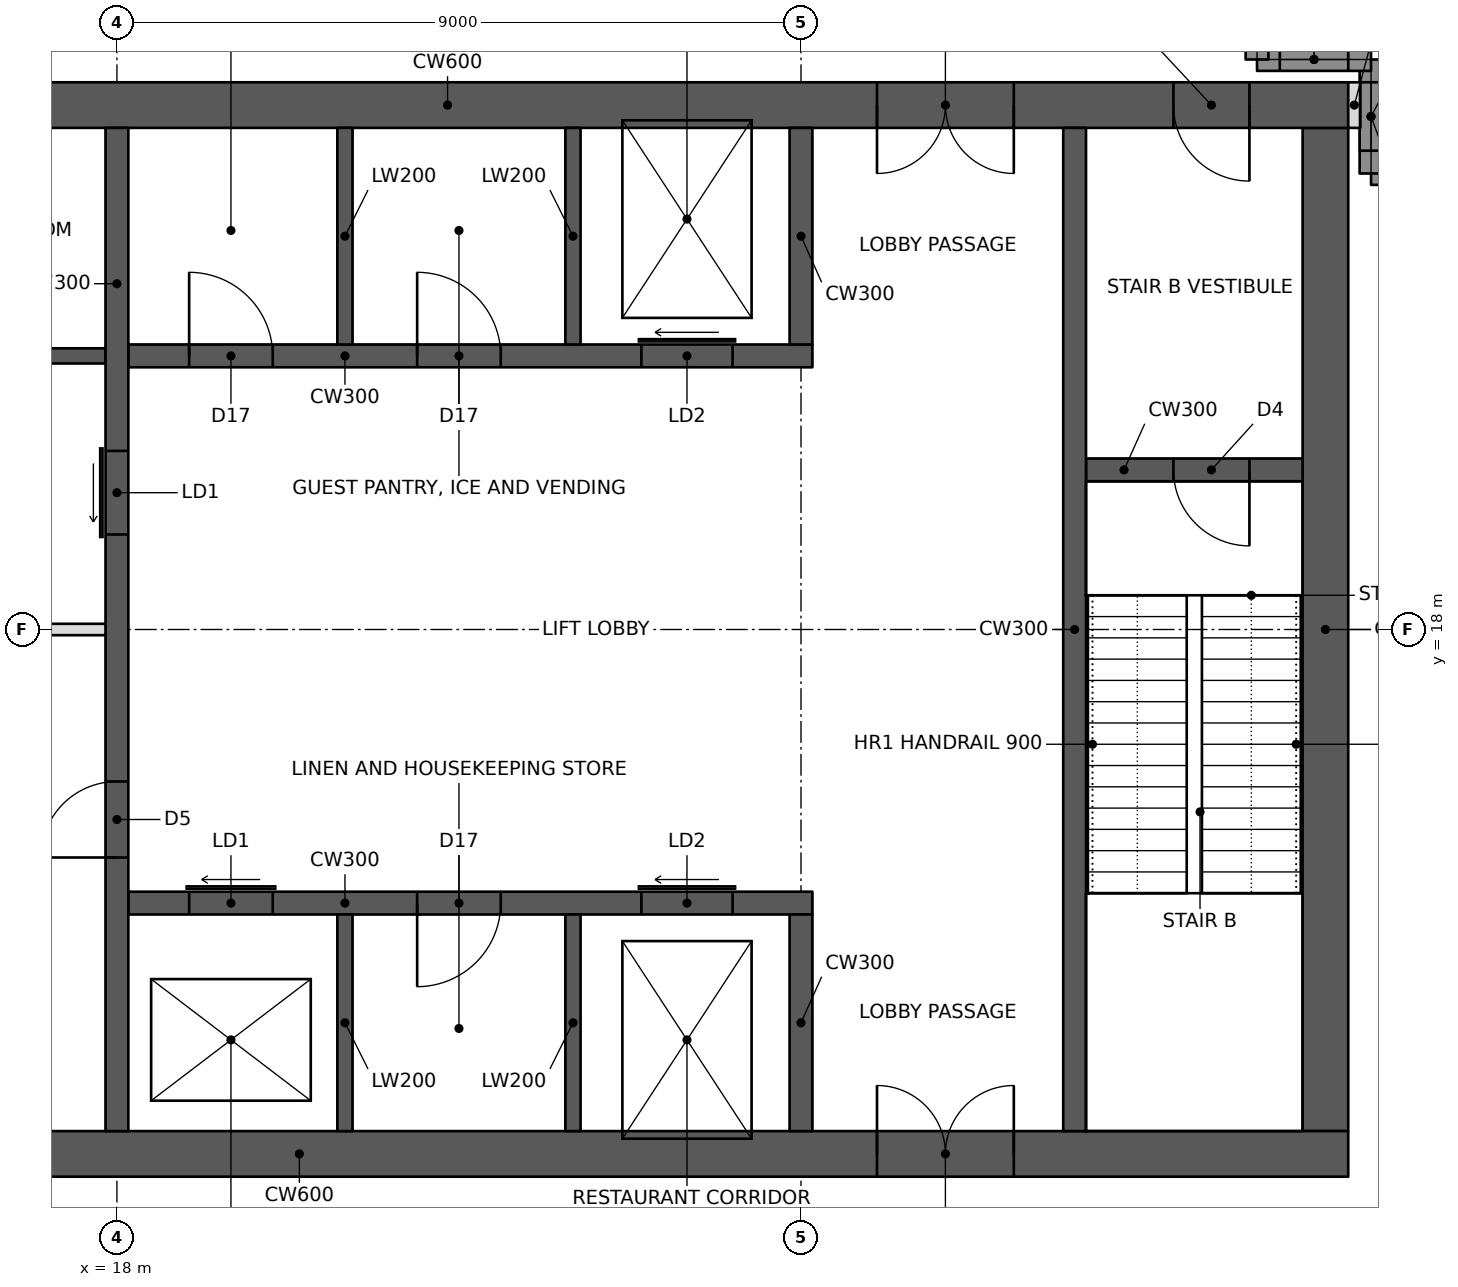
"""IFC4 building model, lengths in metres.
Left out: names, types, materials, properties, quantities, classifications, styles, units other than length and angle.
Written with IfcOpenShell. Run it as: python <this file> out.ifc"""

import sys

from ifc_helpers import new_model, si_unit, direction, frame, frame_2d, origin, place, context, subcontext, project, spatial, rectangle, extrude, element, fill, save


model = new_model("IFC4")
c1 = context("Model", 3, precision=1e-05, world=origin(), true_north=direction((0.0, 1.0)))
c2 = subcontext(c1, "Body", "Model", "MODEL_VIEW")
j1 = project(units=[si_unit("LENGTHUNIT", "METRE"), si_unit("PLANEANGLEUNIT", "RADIAN")], contexts=[c1])
p1 = place(None, origin())
s1 = spatial("IfcSite", under=j1, at=p1, CompositionType="ELEMENT")
p2 = place(p1, origin())
s2 = spatial("IfcBuilding", under=s1, at=p2, CompositionType="ELEMENT")
p3 = place(p2, frame((0.0, 0.0, 269.8)))
s3 = spatial("IfcBuildingStorey", under=s2, at=p3, CompositionType="ELEMENT", Elevation=269.8)
p4 = place(p3, frame((10.8, 11.1, 0.0), z_axis=(0.0, 0.0, 1.0), x_axis=(1.0, 0.0, 0.0)))
e1 = element("IfcWall", 1, at=p4, inside=s3, PredefinedType="SHEAR", context=c2, shape_type="SweptSolid", body=[
    extrude(rectangle(XDim=23.4, YDim=0.6, at=frame_2d((11.7, 0.0))), origin(), (0.0, 0.0, 1.0), 5.0),
])
p5 = place(p4, frame((1.0, 0.0, 0.0)))
e2 = element("IfcOpeningElement", 2, at=p5, cuts=e1, PredefinedType="OPENING", context=c2, shape_type="SweptSolid", body=[
    extrude(rectangle(XDim=1.0, YDim=2.1, at=frame_2d((0.5, 1.05))), frame((0.0, 0.31, 0.0), z_axis=(0.0, -1.0, 0.0), x_axis=(1.0, 0.0, 0.0)), (0.0, 0.0, 1.0), 0.62),
])
p6 = place(p4, frame((17.2, 0.0, 0.0)))
e3 = element("IfcOpeningElement", 3, at=p6, cuts=e1, PredefinedType="OPENING", context=c2, shape_type="SweptSolid", body=[
    extrude(rectangle(XDim=1.8, YDim=2.1, at=frame_2d((0.9, 1.05))), frame((0.0, 0.31, 0.0), z_axis=(0.0, -1.0, 0.0), x_axis=(1.0, 0.0, 0.0)), (0.0, 0.0, 1.0), 0.62),
])
p7 = place(p3, frame((10.8, 24.9, 0.0), z_axis=(0.0, 0.0, 1.0), x_axis=(1.0, 0.0, 0.0)))
e4 = element("IfcWall", 4, at=p7, inside=s3, PredefinedType="SHEAR", context=c2, shape_type="SweptSolid", body=[
    extrude(rectangle(XDim=23.4, YDim=0.6, at=frame_2d((11.7, 0.0))), origin(), (0.0, 0.0, 1.0), 5.0),
])
p8 = place(p7, frame((17.2, 0.0, 0.0)))
e5 = element("IfcOpeningElement", 5, at=p8, cuts=e4, PredefinedType="OPENING", context=c2, shape_type="SweptSolid", body=[
    extrude(rectangle(XDim=1.8, YDim=2.1, at=frame_2d((0.9, 1.05))), frame((0.0, 0.31, 0.0), z_axis=(0.0, -1.0, 0.0), x_axis=(1.0, 0.0, 0.0)), (0.0, 0.0, 1.0), 0.62),
])
p9 = place(p7, frame((21.1, 0.0, 0.0)))
e6 = element("IfcOpeningElement", 6, at=p9, cuts=e4, PredefinedType="OPENING", context=c2, shape_type="SweptSolid", body=[
    extrude(rectangle(XDim=1.0, YDim=2.1, at=frame_2d((0.5, 1.05))), frame((0.0, 0.31, 0.0), z_axis=(0.0, -1.0, 0.0), x_axis=(1.0, 0.0, 0.0)), (0.0, 0.0, 1.0), 0.62),
])
p10 = place(p7, frame((4.9, 0.0, 0.0)))
e7 = element("IfcOpeningElement", 7, at=p10, cuts=e4, PredefinedType="OPENING", context=c2, shape_type="SweptSolid", body=[
    extrude(rectangle(XDim=1.0, YDim=2.1, at=frame_2d((0.5, 1.05))), frame((0.0, 0.31, 0.0), z_axis=(0.0, -1.0, 0.0), x_axis=(1.0, 0.0, 0.0)), (0.0, 0.0, 1.0), 0.62),
])
p11 = place(p3, frame((33.9, 11.4, 0.0), z_axis=(0.0, 0.0, 1.0), x_axis=(0.0, 1.0, 0.0)))
e8 = element("IfcWall", 8, at=p11, inside=s3, PredefinedType="SHEAR", context=c2, shape_type="SweptSolid", body=[
    extrude(rectangle(XDim=13.2, YDim=0.6, at=frame_2d((6.6, 0.0))), origin(), (0.0, 0.0, 1.0), 5.0),
])
p12 = place(p3, frame((18.0, 11.4, 0.0), z_axis=(0.0, 0.0, 1.0), x_axis=(0.0, 1.0, 0.0)))
e9 = element("IfcWall", 9, at=p12, inside=s3, PredefinedType="SHEAR", context=c2, shape_type="SweptSolid", body=[
    extrude(rectangle(XDim=13.2, YDim=0.3, at=frame_2d((6.6, 0.0))), origin(), (0.0, 0.0, 1.0), 5.0),
])
p13 = place(p12, frame((3.6, 0.0, 0.0)))
e10 = element("IfcOpeningElement", 10, at=p13, cuts=e9, PredefinedType="OPENING", context=c2, shape_type="SweptSolid", body=[
    extrude(rectangle(XDim=1.0, YDim=2.1, at=frame_2d((0.5, 1.05))), frame((0.0, 0.16, 0.0), z_axis=(0.0, -1.0, 0.0), x_axis=(1.0, 0.0, 0.0)), (0.0, 0.0, 1.0), 0.32),
])
p14 = place(p12, frame((7.85, 0.0, 0.0)))
e11 = element("IfcOpeningElement", 11, at=p14, cuts=e9, PredefinedType="OPENING", context=c2, shape_type="SweptSolid", body=[
    extrude(rectangle(XDim=1.1, YDim=2.1, at=frame_2d((0.55, 1.05))), frame((0.0, 0.16, 0.0), z_axis=(0.0, -1.0, 0.0), x_axis=(1.0, 0.0, 0.0)), (0.0, 0.0, 1.0), 0.32),
])
p15 = place(p3, frame((14.55, 18.0, 0.0), z_axis=(0.0, 0.0, 1.0), x_axis=(1.0, 0.0, 0.0)))
e12 = element("IfcWall", 12, at=p15, inside=s3, PredefinedType="PARTITIONING", context=c2, shape_type="SweptSolid", body=[
    extrude(rectangle(XDim=3.3, YDim=0.15, at=frame_2d((1.65, 0.0))), origin(), (0.0, 0.0, 1.0), 4.75),
])
p16 = place(p3, frame((18.15, 14.4, 0.0), z_axis=(0.0, 0.0, 1.0), x_axis=(1.0, 0.0, 0.0)))
e13 = element("IfcWall", 13, at=p16, inside=s3, PredefinedType="SHEAR", context=c2, shape_type="SweptSolid", body=[
    extrude(rectangle(XDim=9.0, YDim=0.3, at=frame_2d((4.5, 0.0))), origin(), (0.0, 0.0, 1.0), 5.0),
])
p17 = place(p16, frame((0.8, 0.0, 0.0)))
e14 = element("IfcOpeningElement", 14, at=p17, cuts=e13, PredefinedType="OPENING", context=c2, shape_type="SweptSolid", body=[
    extrude(rectangle(XDim=1.1, YDim=2.1, at=frame_2d((0.55, 1.05))), frame((0.0, 0.16, 0.0), z_axis=(0.0, -1.0, 0.0), x_axis=(1.0, 0.0, 0.0)), (0.0, 0.0, 1.0), 0.32),
])
p18 = place(p16, frame((6.75, 0.0, 0.0)))
e15 = element("IfcOpeningElement", 15, at=p18, cuts=e13, PredefinedType="OPENING", context=c2, shape_type="SweptSolid", body=[
    extrude(rectangle(XDim=1.2, YDim=2.1, at=frame_2d((0.6, 1.05))), frame((0.0, 0.16, 0.0), z_axis=(0.0, -1.0, 0.0), x_axis=(1.0, 0.0, 0.0)), (0.0, 0.0, 1.0), 0.32),
])
p19 = place(p16, frame((3.8, 0.0, 0.0)))
e16 = element("IfcOpeningElement", 16, at=p19, cuts=e13, PredefinedType="OPENING", context=c2, shape_type="SweptSolid", body=[
    extrude(rectangle(XDim=1.1, YDim=2.1, at=frame_2d((0.55, 1.05))), frame((0.0, 0.16, 0.0), z_axis=(0.0, -1.0, 0.0), x_axis=(1.0, 0.0, 0.0)), (0.0, 0.0, 1.0), 0.32),
])
p20 = place(p3, frame((27.0, 11.4, 0.0), z_axis=(0.0, 0.0, 1.0), x_axis=(0.0, 1.0, 0.0)))
e17 = element("IfcWall", 17, at=p20, inside=s3, PredefinedType="SHEAR", context=c2, shape_type="SweptSolid", body=[
    extrude(rectangle(XDim=2.85, YDim=0.3, at=frame_2d((1.425, 0.0))), origin(), (0.0, 0.0, 1.0), 5.0),
])
for number, where, z_axis, x_axis in (
    (18, (21.0, 11.4, 0.0), (0.0, 0.0, 1.0), (0.0, 1.0, 0.0)),
    (19, (24.0, 11.4, 0.0), (0.0, 0.0, 1.0), (0.0, 1.0, 0.0)),
):
    element("IfcWall", number, at=place(p3, frame(where, z_axis=z_axis, x_axis=x_axis)), inside=s3, PredefinedType="SHEAR", context=c2, shape_type="SweptSolid", body=[
        extrude(rectangle(XDim=2.85, YDim=0.2, at=frame_2d((1.425, 0.0))), origin(), (0.0, 0.0, 1.0), 5.0),
    ])
p21 = place(p3, frame((18.15, 21.6, 0.0), z_axis=(0.0, 0.0, 1.0), x_axis=(1.0, 0.0, 0.0)))
e20 = element("IfcWall", 20, at=p21, inside=s3, PredefinedType="SHEAR", context=c2, shape_type="SweptSolid", body=[
    extrude(rectangle(XDim=9.0, YDim=0.3, at=frame_2d((4.5, 0.0))), origin(), (0.0, 0.0, 1.0), 5.0),
])
p22 = place(p21, frame((6.75, 0.0, 0.0)))
e21 = element("IfcOpeningElement", 21, at=p22, cuts=e20, PredefinedType="OPENING", context=c2, shape_type="SweptSolid", body=[
    extrude(rectangle(XDim=1.2, YDim=2.1, at=frame_2d((0.6, 1.05))), frame((0.0, 0.16, 0.0), z_axis=(0.0, -1.0, 0.0), x_axis=(1.0, 0.0, 0.0)), (0.0, 0.0, 1.0), 0.32),
])
p23 = place(p21, frame((0.8, 0.0, 0.0)))
e22 = element("IfcOpeningElement", 22, at=p23, cuts=e20, PredefinedType="OPENING", context=c2, shape_type="SweptSolid", body=[
    extrude(rectangle(XDim=1.1, YDim=2.1, at=frame_2d((0.55, 1.05))), frame((0.0, 0.16, 0.0), z_axis=(0.0, -1.0, 0.0), x_axis=(1.0, 0.0, 0.0)), (0.0, 0.0, 1.0), 0.32),
])
p24 = place(p21, frame((3.8, 0.0, 0.0)))
e23 = element("IfcOpeningElement", 23, at=p24, cuts=e20, PredefinedType="OPENING", context=c2, shape_type="SweptSolid", body=[
    extrude(rectangle(XDim=1.1, YDim=2.1, at=frame_2d((0.55, 1.05))), frame((0.0, 0.16, 0.0), z_axis=(0.0, -1.0, 0.0), x_axis=(1.0, 0.0, 0.0)), (0.0, 0.0, 1.0), 0.32),
])
p25 = place(p3, frame((27.0, 21.75, 0.0), z_axis=(0.0, 0.0, 1.0), x_axis=(0.0, 1.0, 0.0)))
e24 = element("IfcWall", 24, at=p25, inside=s3, PredefinedType="SHEAR", context=c2, shape_type="SweptSolid", body=[
    extrude(rectangle(XDim=2.85, YDim=0.3, at=frame_2d((1.425, 0.0))), origin(), (0.0, 0.0, 1.0), 5.0),
])
for number, where, z_axis, x_axis in (
    (25, (21.0, 21.75, 0.0), (0.0, 0.0, 1.0), (0.0, 1.0, 0.0)),
    (26, (24.0, 21.75, 0.0), (0.0, 0.0, 1.0), (0.0, 1.0, 0.0)),
):
    element("IfcWall", number, at=place(p3, frame(where, z_axis=z_axis, x_axis=x_axis)), inside=s3, PredefinedType="SHEAR", context=c2, shape_type="SweptSolid", body=[
        extrude(rectangle(XDim=2.85, YDim=0.2, at=frame_2d((1.425, 0.0))), origin(), (0.0, 0.0, 1.0), 5.0),
    ])
p26 = place(p3, frame((30.6, 11.4, 0.0), z_axis=(0.0, 0.0, 1.0), x_axis=(0.0, 1.0, 0.0)))
e27 = element("IfcWall", 27, at=p26, inside=s3, PredefinedType="SHEAR", context=c2, shape_type="SweptSolid", body=[
    extrude(rectangle(XDim=13.2, YDim=0.3, at=frame_2d((6.6, 0.0))), origin(), (0.0, 0.0, 1.0), 5.0),
])
p27 = place(p3, frame((30.75, 20.1, 0.0), z_axis=(0.0, 0.0, 1.0), x_axis=(1.0, 0.0, 0.0)))
e28 = element("IfcWall", 28, at=p27, inside=s3, PredefinedType="SHEAR", context=c2, shape_type="SweptSolid", body=[
    extrude(rectangle(XDim=2.85, YDim=0.3, at=frame_2d((1.425, 0.0))), origin(), (0.0, 0.0, 1.0), 5.0),
])
p28 = place(p27, frame((1.15, 0.0, 0.0)))
e29 = element("IfcOpeningElement", 29, at=p28, cuts=e28, PredefinedType="OPENING", context=c2, shape_type="SweptSolid", body=[
    extrude(rectangle(XDim=1.0, YDim=2.1, at=frame_2d((0.5, 1.05))), frame((0.0, 0.16, 0.0), z_axis=(0.0, -1.0, 0.0), x_axis=(1.0, 0.0, 0.0)), (0.0, 0.0, 1.0), 0.32),
])
p29 = place(p3, frame((14.55, 21.6, 0.0), z_axis=(0.0, 0.0, 1.0), x_axis=(1.0, 0.0, 0.0)))
e30 = element("IfcWall", 30, at=p29, inside=s3, PredefinedType="SHEAR", context=c2, shape_type="SweptSolid", body=[
    extrude(rectangle(XDim=3.3, YDim=0.2, at=frame_2d((1.65, 0.0))), origin(), (0.0, 0.0, 1.0), 5.0),
])
p30 = place(p3, frame((36.0, 24.0, 0.0), z_axis=(0.0, 0.0, 1.0), x_axis=(-1.0, 0.0, 0.0)))
e31 = element("IfcWall", 31, at=p30, inside=s3, PredefinedType="SOLIDWALL", context=c2, shape_type="SweptSolid", body=[
    extrude(rectangle(XDim=1.5, YDim=0.3, at=frame_2d((0.75, 0.0))), origin(), (0.0, 0.0, 1.0), 3.97),
])
p31 = place(p3, frame((34.5, 24.0, 0.0), z_axis=(0.0, 0.0, 1.0), x_axis=(0.0, 1.0, 0.0)))
e32 = element("IfcWall", 32, at=p31, inside=s3, PredefinedType="SOLIDWALL", context=c2, shape_type="SweptSolid", body=[
    extrude(rectangle(XDim=1.5, YDim=0.3, at=frame_2d((0.75, 0.0))), origin(), (0.0, 0.0, 1.0), 4.75),
])
p32 = place(p31, frame((0.3, 0.0, 0.6)))
e33 = element("IfcOpeningElement", 33, at=p32, cuts=e32, PredefinedType="OPENING", context=c2, shape_type="SweptSolid", body=[
    extrude(rectangle(XDim=0.9, YDim=2.2, at=frame_2d((0.45, 1.1))), frame((0.0, 0.16, 0.0), z_axis=(0.0, -1.0, 0.0), x_axis=(1.0, 0.0, 0.0)), (0.0, 0.0, 1.0), 0.32),
])
p33 = place(p3, frame((34.5, 25.5, 0.0), z_axis=(0.0, 0.0, 1.0), x_axis=(-1.0, 0.0, 0.0)))
e34 = element("IfcWall", 34, at=p33, inside=s3, PredefinedType="SOLIDWALL", context=c2, shape_type="SweptSolid", body=[
    extrude(rectangle(XDim=1.5, YDim=0.3, at=frame_2d((0.75, 0.0))), origin(), (0.0, 0.0, 1.0), 4.75),
])
p34 = place(p33, frame((0.3, 0.0, 0.6)))
e35 = element("IfcOpeningElement", 35, at=p34, cuts=e34, PredefinedType="OPENING", context=c2, shape_type="SweptSolid", body=[
    extrude(rectangle(XDim=0.9, YDim=2.2, at=frame_2d((0.45, 1.1))), frame((0.0, 0.16, 0.0), z_axis=(0.0, -1.0, 0.0), x_axis=(1.0, 0.0, 0.0)), (0.0, 0.0, 1.0), 0.32),
])
p35 = place(p3, frame((33.0, 25.5, 0.0), z_axis=(0.0, 0.0, 1.0), x_axis=(0.0, 1.0, 0.0)))
e36 = element("IfcWall", 36, at=p35, inside=s3, PredefinedType="SOLIDWALL", context=c2, shape_type="SweptSolid", body=[
    extrude(rectangle(XDim=1.5, YDim=0.3, at=frame_2d((0.75, 0.0))), origin(), (0.0, 0.0, 1.0), 3.97),
])
p36 = place(p3, frame((34.2, 24.9, 0.0), z_axis=(0.0, 0.0, 1.0), x_axis=(1.0, 0.0, 0.0)))
e37 = element("IfcWall", 37, at=p36, inside=s3, PredefinedType="PARTITIONING", context=c2, shape_type="SweptSolid", body=[
    extrude(rectangle(XDim=0.16, YDim=0.6, at=frame_2d((0.08, 0.0))), origin(), (0.0, 0.0, 1.0), 4.75),
])
p37 = place(p32, origin())
e38 = element("IfcWindow", 38, at=p37, inside=s3, PartitioningType="SINGLE_PANEL", PredefinedType="WINDOW", context=c2, shape_type="SweptSolid", body=[
    extrude(rectangle(XDim=0.9, YDim=2.2, at=frame_2d((0.45, 1.1))), frame((0.0, 0.03, 0.0), z_axis=(0.0, -1.0, 0.0), x_axis=(1.0, 0.0, 0.0)), (0.0, 0.0, 1.0), 0.06),
])
fill(e33, e38)
p38 = place(p34, origin())
e39 = element("IfcWindow", 39, at=p38, inside=s3, PartitioningType="SINGLE_PANEL", PredefinedType="WINDOW", context=c2, shape_type="SweptSolid", body=[
    extrude(rectangle(XDim=0.9, YDim=2.2, at=frame_2d((0.45, 1.1))), frame((0.0, 0.03, 0.0), z_axis=(0.0, -1.0, 0.0), x_axis=(1.0, 0.0, 0.0)), (0.0, 0.0, 1.0), 0.06),
])
fill(e35, e39)
p39 = place(p6, origin())
e40 = element("IfcDoor", 40, at=p39, inside=s3, OperationType="DOUBLE_DOOR_SINGLE_SWING", PredefinedType="DOOR", context=c2, shape_type="SweptSolid", body=[
    extrude(rectangle(XDim=1.8, YDim=2.1, at=frame_2d((0.9, 1.05))), frame((0.0, 0.025, 0.0), z_axis=(0.0, -1.0, 0.0), x_axis=(1.0, 0.0, 0.0)), (0.0, 0.0, 1.0), 0.05),
])
fill(e3, e40)
p40 = place(p8, frame((1.8, 0.0, 0.0), z_axis=(0.0, 0.0, 1.0), x_axis=(-1.0, 0.0, 0.0)))
e41 = element("IfcDoor", 41, at=p40, inside=s3, OperationType="DOUBLE_DOOR_SINGLE_SWING", PredefinedType="DOOR", context=c2, shape_type="SweptSolid", body=[
    extrude(rectangle(XDim=1.8, YDim=2.1, at=frame_2d((0.9, 1.05))), frame((0.0, 0.025, 0.0), z_axis=(0.0, -1.0, 0.0), x_axis=(1.0, 0.0, 0.0)), (0.0, 0.0, 1.0), 0.05),
])
fill(e5, e41)
p41 = place(p9, frame((1.0, 0.0, 0.0), z_axis=(0.0, 0.0, 1.0), x_axis=(-1.0, 0.0, 0.0)))
e42 = element("IfcDoor", 42, at=p41, inside=s3, OperationType="SINGLE_SWING_LEFT", PredefinedType="DOOR", context=c2, shape_type="SweptSolid", body=[
    extrude(rectangle(XDim=1.0, YDim=2.1, at=frame_2d((0.5, 1.05))), frame((0.0, 0.025, 0.0), z_axis=(0.0, -1.0, 0.0), x_axis=(1.0, 0.0, 0.0)), (0.0, 0.0, 1.0), 0.05),
])
fill(e6, e42)
p42 = place(p28, frame((1.0, 0.0, 0.0), z_axis=(0.0, 0.0, 1.0), x_axis=(-1.0, 0.0, 0.0)))
e43 = element("IfcDoor", 43, at=p42, inside=s3, OperationType="SINGLE_SWING_LEFT", PredefinedType="DOOR", context=c2, shape_type="SweptSolid", body=[
    extrude(rectangle(XDim=1.0, YDim=2.1, at=frame_2d((0.5, 1.05))), frame((0.0, 0.025, 0.0), z_axis=(0.0, -1.0, 0.0), x_axis=(1.0, 0.0, 0.0)), (0.0, 0.0, 1.0), 0.05),
])
fill(e29, e43)
p43 = place(p13, origin())
e44 = element("IfcDoor", 44, at=p43, inside=s3, OperationType="SINGLE_SWING_LEFT", PredefinedType="DOOR", context=c2, shape_type="SweptSolid", body=[
    extrude(rectangle(XDim=1.0, YDim=2.1, at=frame_2d((0.5, 1.05))), frame((0.0, 0.025, 0.0), z_axis=(0.0, -1.0, 0.0), x_axis=(1.0, 0.0, 0.0)), (0.0, 0.0, 1.0), 0.05),
])
fill(e10, e44)
p44 = place(p17, origin())
e45 = element("IfcDoor", 45, at=p44, inside=s3, OperationType="SLIDING_TO_LEFT", PredefinedType="DOOR", context=c2, shape_type="SweptSolid", body=[
    extrude(rectangle(XDim=1.1, YDim=2.1, at=frame_2d((0.55, 1.05))), frame((0.0, 0.025, 0.0), z_axis=(0.0, -1.0, 0.0), x_axis=(1.0, 0.0, 0.0)), (0.0, 0.0, 1.0), 0.05),
])
fill(e14, e45)
p45 = place(p14, origin())
e46 = element("IfcDoor", 46, at=p45, inside=s3, OperationType="SLIDING_TO_LEFT", PredefinedType="DOOR", context=c2, shape_type="SweptSolid", body=[
    extrude(rectangle(XDim=1.1, YDim=2.1, at=frame_2d((0.55, 1.05))), frame((0.0, 0.025, 0.0), z_axis=(0.0, -1.0, 0.0), x_axis=(1.0, 0.0, 0.0)), (0.0, 0.0, 1.0), 0.05),
])
fill(e11, e46)
p46 = place(p18, origin())
e47 = element("IfcDoor", 47, at=p46, inside=s3, OperationType="SLIDING_TO_LEFT", PredefinedType="DOOR", context=c2, shape_type="SweptSolid", body=[
    extrude(rectangle(XDim=1.2, YDim=2.1, at=frame_2d((0.6, 1.05))), frame((0.0, 0.025, 0.0), z_axis=(0.0, -1.0, 0.0), x_axis=(1.0, 0.0, 0.0)), (0.0, 0.0, 1.0), 0.05),
])
fill(e15, e47)
p47 = place(p22, origin())
e48 = element("IfcDoor", 48, at=p47, inside=s3, OperationType="SLIDING_TO_LEFT", PredefinedType="DOOR", context=c2, shape_type="SweptSolid", body=[
    extrude(rectangle(XDim=1.2, YDim=2.1, at=frame_2d((0.6, 1.05))), frame((0.0, 0.025, 0.0), z_axis=(0.0, -1.0, 0.0), x_axis=(1.0, 0.0, 0.0)), (0.0, 0.0, 1.0), 0.05),
])
fill(e21, e48)
p48 = place(p23, origin())
e49 = element("IfcDoor", 49, at=p48, inside=s3, OperationType="SINGLE_SWING_LEFT", PredefinedType="DOOR", context=c2, shape_type="SweptSolid", body=[
    extrude(rectangle(XDim=1.1, YDim=2.1, at=frame_2d((0.55, 1.05))), frame((0.0, 0.025, 0.0), z_axis=(0.0, -1.0, 0.0), x_axis=(1.0, 0.0, 0.0)), (0.0, 0.0, 1.0), 0.05),
])
fill(e22, e49)
p49 = place(p24, origin())
e50 = element("IfcDoor", 50, at=p49, inside=s3, OperationType="SINGLE_SWING_LEFT", PredefinedType="DOOR", context=c2, shape_type="SweptSolid", body=[
    extrude(rectangle(XDim=1.1, YDim=2.1, at=frame_2d((0.55, 1.05))), frame((0.0, 0.025, 0.0), z_axis=(0.0, -1.0, 0.0), x_axis=(1.0, 0.0, 0.0)), (0.0, 0.0, 1.0), 0.05),
])
fill(e23, e50)
p50 = place(p19, frame((1.1, 0.0, 0.0), z_axis=(0.0, 0.0, 1.0), x_axis=(-1.0, 0.0, 0.0)))
e51 = element("IfcDoor", 51, at=p50, inside=s3, OperationType="SINGLE_SWING_RIGHT", PredefinedType="DOOR", context=c2, shape_type="SweptSolid", body=[
    extrude(rectangle(XDim=1.1, YDim=2.1, at=frame_2d((0.55, 1.05))), frame((0.0, 0.025, 0.0), z_axis=(0.0, -1.0, 0.0), x_axis=(1.0, 0.0, 0.0)), (0.0, 0.0, 1.0), 0.05),
])
fill(e16, e51)
save(model, sys.argv[1])
